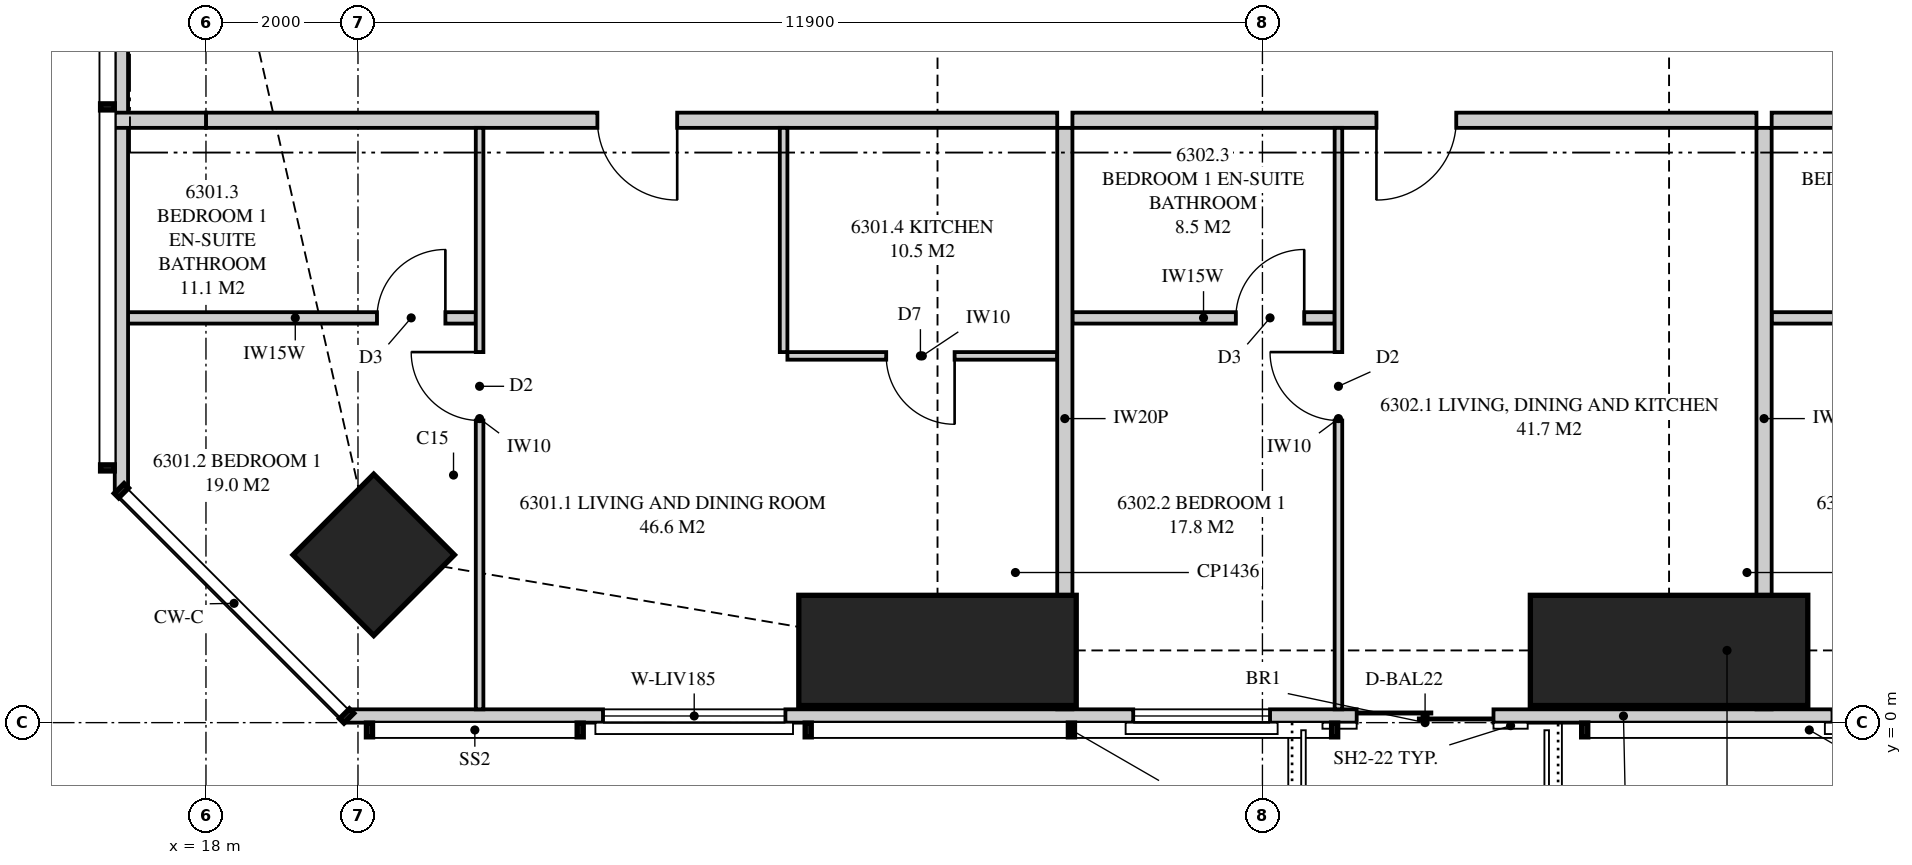
"""IFC4 building model, lengths in metres.
Left out: names, types, materials, properties, quantities, classifications, styles, units other than length and angle.
Written with IfcOpenShell. Run it as: python <this file> out.ifc"""

import sys

from ifc_helpers import new_model, si_unit, direction, frame, frame_2d, origin, origin_2d, place, context, subcontext, project, spatial, polyline, rectangle, outline, extrude, element, fill, save


model = new_model("IFC4")
c1 = context("Model", 3, precision=1e-05, world=origin(), true_north=direction((0.0, 1.0)))
c2 = subcontext(c1, "Body", "Model", "MODEL_VIEW")
j1 = project(units=[si_unit("LENGTHUNIT", "METRE"), si_unit("PLANEANGLEUNIT", "RADIAN")], contexts=[c1])
p1 = place(None, origin())
s1 = spatial("IfcSite", under=j1, at=p1, CompositionType="ELEMENT")
p2 = place(p1, origin())
s2 = spatial("IfcBuilding", under=s1, at=p2, CompositionType="ELEMENT")
p3 = place(p2, frame((0.0, 0.0, 231.95)))
s3 = spatial("IfcBuildingStorey", under=s2, at=p3, CompositionType="ELEMENT", Elevation=231.95)
p4 = place(p3, frame((20.207, 2.207, 0.0), z_axis=(0.0, 0.0, 1.0), x_axis=(0.707106781187, 0.707106781187, 0.0)))
e1 = element("IfcColumn", 1, at=p4, inside=s3, PredefinedType="COLUMN", context=c2, shape_type="SweptSolid", body=[
    extrude(rectangle(XDim=1.5, YDim=1.5, at=origin_2d()), origin(), (0.0, 0.0, 1.0), 3.5),
])
for number, where, z_axis, x_axis in (
    (2, (27.625, 0.95, 0.0), (0.0, 0.0, 1.0), (0.0, 1.0, 0.0)),
    (3, (37.25, 0.95, 0.0), (0.0, 0.0, 1.0), (0.0, 1.0, 0.0)),
):
    element("IfcColumn", number, at=place(p3, frame(where, z_axis=z_axis, x_axis=x_axis)), inside=s3, PredefinedType="COLUMN", context=c2, shape_type="SweptSolid", body=[
        extrude(rectangle(XDim=1.45, YDim=3.65, at=origin_2d()), origin(), (0.0, 0.0, 1.0), 3.5),
    ])
p5 = place(p3, frame((19.851, 0.087, 0.0), z_axis=(0.0, 0.0, 1.0), x_axis=(1.0, 0.0, 0.0)))
e4 = element("IfcWall", 4, at=p5, inside=s3, PredefinedType="SOLIDWALL", context=c2, shape_type="SweptSolid", body=[
    extrude(outline(polyline([(0.0, 0.0), (33.597, 0.0), (33.597, 3.26), (27.239, 3.26), (27.239, 2.3), (27.155, 2.3), (27.155, 3.26), (27.024, 3.26), (27.024, 2.3), (7.774, 2.3), (7.774, 3.26), (7.642, 3.26), (7.642, 2.3), (7.559, 2.3), (7.559, 3.26), (0.0, 3.26), (0.0, 0.0)])), frame((0.0, 0.087, 0.0), z_axis=(0.0, -1.0, 0.0), x_axis=(1.0, 0.0, 0.0)), (0.0, 0.0, 1.0), 0.175),
])
p6 = place(p5, frame((3.373, 0.0, 0.4)))
e5 = element("IfcOpeningElement", 5, at=p6, cuts=e4, PredefinedType="OPENING", context=c2, shape_type="SweptSolid", body=[
    extrude(rectangle(XDim=2.4, YDim=1.85, at=frame_2d((1.2, 0.925))), frame((0.0, 0.097, 0.0), z_axis=(0.0, -1.0, 0.0), x_axis=(1.0, 0.0, 0.0)), (0.0, 0.0, 1.0), 0.195),
])
p7 = place(p5, frame((10.349, 0.0, 0.4)))
e6 = element("IfcOpeningElement", 6, at=p7, cuts=e4, PredefinedType="OPENING", context=c2, shape_type="SweptSolid", body=[
    extrude(rectangle(XDim=1.8, YDim=1.85, at=frame_2d((0.9, 0.925))), frame((0.0, 0.097, 0.0), z_axis=(0.0, -1.0, 0.0), x_axis=(1.0, 0.0, 0.0)), (0.0, 0.0, 1.0), 0.195),
])
p8 = place(p5, frame((13.289, 0.0, 0.0)))
e7 = element("IfcOpeningElement", 7, at=p8, cuts=e4, PredefinedType="OPENING", context=c2, shape_type="SweptSolid", body=[
    extrude(rectangle(XDim=1.8, YDim=2.25, at=frame_2d((0.9, 1.125))), frame((0.0, 0.097, 0.0), z_axis=(0.0, -1.0, 0.0), x_axis=(1.0, 0.0, 0.0)), (0.0, 0.0, 1.0), 0.195),
])
p9 = place(p5, frame((19.549, 0.0, 0.4)))
e8 = element("IfcOpeningElement", 8, at=p9, cuts=e4, PredefinedType="OPENING", context=c2, shape_type="SweptSolid", body=[
    extrude(rectangle(XDim=1.8, YDim=1.85, at=frame_2d((0.9, 0.925))), frame((0.0, 0.097, 0.0), z_axis=(0.0, -1.0, 0.0), x_axis=(1.0, 0.0, 0.0)), (0.0, 0.0, 1.0), 0.195),
])
p10 = place(p5, frame((23.149, 0.0, 0.4)))
e9 = element("IfcOpeningElement", 9, at=p10, cuts=e4, PredefinedType="OPENING", context=c2, shape_type="SweptSolid", body=[
    extrude(rectangle(XDim=1.8, YDim=1.85, at=frame_2d((0.9, 0.925))), frame((0.0, 0.097, 0.0), z_axis=(0.0, -1.0, 0.0), x_axis=(1.0, 0.0, 0.0)), (0.0, 0.0, 1.0), 0.195),
])
p11 = place(p5, frame((28.979, 0.0, 0.4)))
e10 = element("IfcOpeningElement", 10, at=p11, cuts=e4, PredefinedType="OPENING", context=c2, shape_type="SweptSolid", body=[
    extrude(rectangle(XDim=1.8, YDim=1.85, at=frame_2d((0.9, 0.925))), frame((0.0, 0.097, 0.0), z_axis=(0.0, -1.0, 0.0), x_axis=(1.0, 0.0, 0.0)), (0.0, 0.0, 1.0), 0.195),
])
p12 = place(p5, frame((31.861, 0.0, 0.4)))
e11 = element("IfcOpeningElement", 11, at=p12, cuts=e4, PredefinedType="OPENING", context=c2, shape_type="SweptSolid", body=[
    extrude(rectangle(XDim=1.2, YDim=1.85, at=frame_2d((0.6, 0.925))), frame((0.0, 0.097, 0.0), z_axis=(0.0, -1.0, 0.0), x_axis=(1.0, 0.0, 0.0)), (0.0, 0.0, 1.0), 0.195),
])
p13 = place(p3, frame((16.887, 30.949, 0.0), z_axis=(0.0, 0.0, 1.0), x_axis=(0.0, -1.0, 0.0)))
e12 = element("IfcWall", 12, at=p13, inside=s3, PredefinedType="SOLIDWALL", context=c2, shape_type="SweptSolid", body=[
    extrude(outline(polyline([(0.0, 0.0), (27.897, 0.0), (27.897, 3.26), (18.148, 3.26), (18.148, 2.3), (18.125, 2.3), (18.125, 3.26), (17.949, 3.26), (17.949, 2.3), (5.949, 2.3), (5.949, 3.26), (0.0, 3.26), (0.0, 0.0)])), frame((0.0, 0.087, 0.0), z_axis=(0.0, -1.0, 0.0), x_axis=(1.0, 0.0, 0.0)), (0.0, 0.0, 1.0), 0.175),
])
p14 = place(p13, frame((11.849, 0.0, 0.4)))
e13 = element("IfcOpeningElement", 13, at=p14, cuts=e12, PredefinedType="OPENING", context=c2, shape_type="SweptSolid", body=[
    extrude(rectangle(XDim=1.2, YDim=1.85, at=frame_2d((0.6, 0.925))), frame((0.0, 0.097, 0.0), z_axis=(0.0, -1.0, 0.0), x_axis=(1.0, 0.0, 0.0)), (0.0, 0.0, 1.0), 0.195),
])
p15 = place(p3, frame((29.3, 0.175, 0.0), z_axis=(0.0, 0.0, 1.0), x_axis=(0.0, 1.0, 0.0)))
e14 = element("IfcWall", 14, at=p15, inside=s3, PredefinedType="PARTITIONING", context=c2, shape_type="SweptSolid", body=[
    extrude(outline(polyline([(0.0, 0.0), (7.65, 0.0), (7.65, 3.26), (1.685, 3.26), (1.685, 2.3), (0.0, 2.3), (0.0, 3.26), (0.0, 0.0)])), frame((0.0, 0.1, 0.0), z_axis=(0.0, -1.0, 0.0), x_axis=(1.0, 0.0, 0.0)), (0.0, 0.0, 1.0), 0.2),
])
p16 = place(p3, frame((18.0, 7.925, 0.0), z_axis=(0.0, 0.0, 1.0), x_axis=(1.0, 0.0, 0.0)))
e15 = element("IfcWall", 15, at=p16, inside=s3, PredefinedType="PARTITIONING", context=c2, shape_type="SweptSolid", body=[
    extrude(outline(polyline([(0.0, 0.0), (11.2, 0.0), (11.2, 3.26), (10.935, 3.26), (10.935, 2.66), (8.315, 2.66), (8.315, 3.26), (1.839, 3.26), (1.839, 2.3), (0.0, 2.3), (0.0, 3.26), (0.0, 0.0)])), frame((0.0, 0.1, 0.0), z_axis=(0.0, -1.0, 0.0), x_axis=(1.0, 0.0, 0.0)), (0.0, 0.0, 1.0), 0.2),
])
p17 = place(p16, frame((5.15, 0.0, 0.0)))
e16 = element("IfcOpeningElement", 16, at=p17, cuts=e15, PredefinedType="OPENING", context=c2, shape_type="SweptSolid", body=[
    extrude(rectangle(XDim=1.05, YDim=2.2, at=frame_2d((0.525, 1.1))), frame((0.0, 0.11, 0.0), z_axis=(0.0, -1.0, 0.0), x_axis=(1.0, 0.0, 0.0)), (0.0, 0.0, 1.0), 0.22),
])
p18 = place(p3, frame((21.6, 0.175, 0.0), z_axis=(0.0, 0.0, 1.0), x_axis=(0.0, 1.0, 0.0)))
e17 = element("IfcWall", 17, at=p18, inside=s3, PredefinedType="PARTITIONING", context=c2, shape_type="SweptSolid", body=[
    extrude(outline(polyline([(0.0, 0.0), (7.65, 0.0), (7.65, 3.26), (2.668, 3.26), (2.668, 2.3), (0.924, 2.3), (0.924, 3.26), (0.0, 3.26), (0.0, 0.0)])), frame((0.0, 0.05, 0.0), z_axis=(0.0, -1.0, 0.0), x_axis=(1.0, 0.0, 0.0)), (0.0, 0.0, 1.0), 0.1),
])
p19 = place(p18, frame((3.8, 0.0, 0.0)))
e18 = element("IfcOpeningElement", 18, at=p19, cuts=e17, PredefinedType="OPENING", context=c2, shape_type="SweptSolid", body=[
    extrude(rectangle(XDim=0.9, YDim=2.1, at=frame_2d((0.45, 1.05))), frame((0.0, 0.06, 0.0), z_axis=(0.0, -1.0, 0.0), x_axis=(1.0, 0.0, 0.0)), (0.0, 0.0, 1.0), 0.12),
])
p20 = place(p3, frame((16.8, 5.325, 0.0), z_axis=(0.0, 0.0, 1.0), x_axis=(1.0, 0.0, 0.0)))
e19 = element("IfcWall", 19, at=p20, inside=s3, PredefinedType="PLUMBINGWALL", context=c2, shape_type="SweptSolid", body=[
    extrude(outline(polyline([(0.0, 0.0), (4.75, 0.0), (4.75, 3.26), (3.605, 3.26), (3.605, 2.3), (1.79, 2.3), (1.79, 3.26), (0.0, 3.26), (0.0, 0.0)])), frame((0.0, 0.075, 0.0), z_axis=(0.0, -1.0, 0.0), x_axis=(1.0, 0.0, 0.0)), (0.0, 0.0, 1.0), 0.15),
])
p21 = place(p20, frame((3.45, 0.0, 0.0)))
e20 = element("IfcOpeningElement", 20, at=p21, cuts=e19, PredefinedType="OPENING", context=c2, shape_type="SweptSolid", body=[
    extrude(rectangle(XDim=0.9, YDim=2.1, at=frame_2d((0.45, 1.05))), frame((0.0, 0.085, 0.0), z_axis=(0.0, -1.0, 0.0), x_axis=(1.0, 0.0, 0.0)), (0.0, 0.0, 1.0), 0.17),
])
p22 = place(p3, frame((25.65, 4.825, 0.0), z_axis=(0.0, 0.0, 1.0), x_axis=(1.0, 0.0, 0.0)))
e21 = element("IfcWall", 21, at=p22, inside=s3, PredefinedType="PARTITIONING", context=c2, shape_type="SweptSolid", body=[
    extrude(outline(polyline([(0.0, 0.0), (3.55, 0.0), (3.55, 3.26), (3.235, 3.26), (3.235, 2.66), (0.715, 2.66), (0.715, 3.26), (0.0, 3.26), (0.0, 0.0)])), frame((0.0, 0.05, 0.0), z_axis=(0.0, -1.0, 0.0), x_axis=(1.0, 0.0, 0.0)), (0.0, 0.0, 1.0), 0.1),
])
p23 = place(p22, frame((1.3, 0.0, 0.0)))
e22 = element("IfcOpeningElement", 22, at=p23, cuts=e21, PredefinedType="OPENING", context=c2, shape_type="SweptSolid", body=[
    extrude(rectangle(XDim=0.9, YDim=2.1, at=frame_2d((0.45, 1.05))), frame((0.0, 0.06, 0.0), z_axis=(0.0, -1.0, 0.0), x_axis=(1.0, 0.0, 0.0)), (0.0, 0.0, 1.0), 0.12),
])
p24 = place(p3, frame((25.6, 4.875, 0.0), z_axis=(0.0, 0.0, 1.0), x_axis=(0.0, 1.0, 0.0)))
e23 = element("IfcWall", 23, at=p24, inside=s3, PredefinedType="PARTITIONING", context=c2, shape_type="SweptSolid", body=[
    extrude(rectangle(XDim=2.95, YDim=0.1, at=frame_2d((1.475, 0.0))), origin(), (0.0, 0.0, 1.0), 3.26),
])
p25 = place(p3, frame((38.5, 0.175, 0.0), z_axis=(0.0, 0.0, 1.0), x_axis=(0.0, 1.0, 0.0)))
e24 = element("IfcWall", 24, at=p25, inside=s3, PredefinedType="PARTITIONING", context=c2, shape_type="SweptSolid", body=[
    extrude(outline(polyline([(0.529, 2.3), (0.0, 2.3), (0.0, 0.0), (0.529, 0.0), (0.529, 0.281), (1.021, 0.281), (1.021, 0.0), (7.65, 0.0), (7.65, 2.66), (1.685, 2.66), (1.685, 2.3), (1.021, 2.3), (1.021, 2.019), (0.529, 2.019), (0.529, 2.3)])), frame((0.0, 0.1, 0.0), z_axis=(0.0, -1.0, 0.0), x_axis=(1.0, 0.0, 0.0)), (0.0, 0.0, 1.0), 0.2),
])
p26 = place(p3, frame((29.4, 7.925, 0.0), z_axis=(0.0, 0.0, 1.0), x_axis=(1.0, 0.0, 0.0)))
e25 = element("IfcWall", 25, at=p26, inside=s3, PredefinedType="PARTITIONING", context=c2, shape_type="SweptSolid", body=[
    extrude(outline(polyline([(0.0, 0.0), (9.0, 0.0), (9.0, 3.26), (9.0, 2.66), (6.54, 2.66), (6.54, 3.26), (0.0, 3.26), (0.0, 0.0)])), frame((0.0, 0.1, 0.0), z_axis=(0.0, -1.0, 0.0), x_axis=(1.0, 0.0, 0.0)), (0.0, 0.0, 1.0), 0.2),
])
p27 = place(p26, frame((4.0, 0.0, 0.0)))
e26 = element("IfcOpeningElement", 26, at=p27, cuts=e25, PredefinedType="OPENING", context=c2, shape_type="SweptSolid", body=[
    extrude(rectangle(XDim=1.05, YDim=2.2, at=frame_2d((0.525, 1.1))), frame((0.0, 0.11, 0.0), z_axis=(0.0, -1.0, 0.0), x_axis=(1.0, 0.0, 0.0)), (0.0, 0.0, 1.0), 0.22),
])
p28 = place(p3, frame((32.9, 0.175, 0.0), z_axis=(0.0, 0.0, 1.0), x_axis=(0.0, 1.0, 0.0)))
e27 = element("IfcWall", 27, at=p28, inside=s3, PredefinedType="PARTITIONING", context=c2, shape_type="SweptSolid", body=[
    extrude(outline(polyline([(0.0, 0.0), (7.65, 0.0), (7.65, 3.26), (1.635, 3.26), (1.635, 2.3), (0.0, 2.3), (0.0, 3.26), (0.0, 0.0)])), frame((0.0, 0.05, 0.0), z_axis=(0.0, -1.0, 0.0), x_axis=(1.0, 0.0, 0.0)), (0.0, 0.0, 1.0), 0.1),
])
p29 = place(p28, frame((3.8, 0.0, 0.0)))
e28 = element("IfcOpeningElement", 28, at=p29, cuts=e27, PredefinedType="OPENING", context=c2, shape_type="SweptSolid", body=[
    extrude(rectangle(XDim=0.9, YDim=2.1, at=frame_2d((0.45, 1.05))), frame((0.0, 0.06, 0.0), z_axis=(0.0, -1.0, 0.0), x_axis=(1.0, 0.0, 0.0)), (0.0, 0.0, 1.0), 0.12),
])
p30 = place(p3, frame((29.4, 5.325, 0.0), z_axis=(0.0, 0.0, 1.0), x_axis=(1.0, 0.0, 0.0)))
e29 = element("IfcWall", 29, at=p30, inside=s3, PredefinedType="PLUMBINGWALL", context=c2, shape_type="SweptSolid", body=[
    extrude(rectangle(XDim=3.45, YDim=0.15, at=frame_2d((1.725, 0.0))), origin(), (0.0, 0.0, 1.0), 3.26),
])
p31 = place(p30, frame((2.15, 0.0, 0.0)))
e30 = element("IfcOpeningElement", 30, at=p31, cuts=e29, PredefinedType="OPENING", context=c2, shape_type="SweptSolid", body=[
    extrude(rectangle(XDim=0.9, YDim=2.1, at=frame_2d((0.45, 1.05))), frame((0.0, 0.085, 0.0), z_axis=(0.0, -1.0, 0.0), x_axis=(1.0, 0.0, 0.0)), (0.0, 0.0, 1.0), 0.17),
])
p32 = place(p3, frame((38.6, 7.925, 0.0), z_axis=(0.0, 0.0, 1.0), x_axis=(1.0, 0.0, 0.0)))
e31 = element("IfcWall", 31, at=p32, inside=s3, PredefinedType="PARTITIONING", context=c2, shape_type="SweptSolid", body=[
    extrude(outline(polyline([(0.0, 0.0), (17.725, 0.0), (17.725, 3.26), (17.275, 3.26), (17.275, 2.3), (15.443, 2.3), (15.443, 3.26), (9.585, 3.26), (9.585, 2.66), (6.965, 2.66), (6.965, 3.26), (0.0, 3.26), (0.0, 0.0)])), frame((0.0, 0.1, 0.0), z_axis=(0.0, -1.0, 0.0), x_axis=(1.0, 0.0, 0.0)), (0.0, 0.0, 1.0), 0.2),
])
p33 = place(p32, frame((12.9, 0.0, 0.0)))
e32 = element("IfcOpeningElement", 32, at=p33, cuts=e31, PredefinedType="OPENING", context=c2, shape_type="SweptSolid", body=[
    extrude(rectangle(XDim=1.05, YDim=2.2, at=frame_2d((0.525, 1.1))), frame((0.0, 0.11, 0.0), z_axis=(0.0, -1.0, 0.0), x_axis=(1.0, 0.0, 0.0)), (0.0, 0.0, 1.0), 0.22),
])
p34 = place(p3, frame((38.6, 5.325, 0.0), z_axis=(0.0, 0.0, 1.0), x_axis=(1.0, 0.0, 0.0)))
e33 = element("IfcWall", 33, at=p34, inside=s3, PredefinedType="PLUMBINGWALL", context=c2, shape_type="SweptSolid", body=[
    extrude(rectangle(XDim=3.45, YDim=0.15, at=frame_2d((1.725, 0.0))), origin(), (0.0, 0.0, 1.0), 3.26),
])
p35 = place(p34, frame((2.15, 0.0, 0.0)))
e34 = element("IfcOpeningElement", 34, at=p35, cuts=e33, PredefinedType="OPENING", context=c2, shape_type="SweptSolid", body=[
    extrude(rectangle(XDim=0.9, YDim=2.1, at=frame_2d((0.45, 1.05))), frame((0.0, 0.085, 0.0), z_axis=(0.0, -1.0, 0.0), x_axis=(1.0, 0.0, 0.0)), (0.0, 0.0, 1.0), 0.17),
])
p36 = place(p3, frame((16.8, 7.925, 0.0), z_axis=(0.0, 0.0, 1.0), x_axis=(1.0, 0.0, 0.0)))
e35 = element("IfcWall", 35, at=p36, inside=s3, PredefinedType="PARTITIONING", context=c2, shape_type="SweptSolid", body=[
    extrude(outline(polyline([(0.0, 0.0), (1.2, 0.0), (1.2, 3.26), (1.2, 2.3), (1.172, 2.3), (1.172, 3.26), (0.0, 3.26), (0.0, 0.0)])), frame((0.0, 0.1, 0.0), z_axis=(0.0, -1.0, 0.0), x_axis=(1.0, 0.0, 0.0)), (0.0, 0.0, 1.0), 0.2),
])
p37 = place(p6, origin())
e36 = element("IfcWindow", 36, at=p37, inside=s3, PartitioningType="SINGLE_PANEL", PredefinedType="WINDOW", context=c2, shape_type="SweptSolid", body=[
    extrude(rectangle(XDim=2.4, YDim=1.85, at=frame_2d((1.2, 0.925))), frame((0.0, 0.03, 0.0), z_axis=(0.0, -1.0, 0.0), x_axis=(1.0, 0.0, 0.0)), (0.0, 0.0, 1.0), 0.06),
])
fill(e5, e36)
p38 = place(p7, origin())
e37 = element("IfcWindow", 37, at=p38, inside=s3, PartitioningType="SINGLE_PANEL", PredefinedType="WINDOW", context=c2, shape_type="SweptSolid", body=[
    extrude(rectangle(XDim=1.8, YDim=1.85, at=frame_2d((0.9, 0.925))), frame((0.0, 0.03, 0.0), z_axis=(0.0, -1.0, 0.0), x_axis=(1.0, 0.0, 0.0)), (0.0, 0.0, 1.0), 0.06),
])
fill(e6, e37)
p39 = place(p8, origin())
e38 = element("IfcDoor", 38, at=p39, inside=s3, OperationType="SLIDING_TO_LEFT", PredefinedType="DOOR", context=c2, shape_type="SweptSolid", body=[
    extrude(rectangle(XDim=1.8, YDim=2.25, at=frame_2d((0.9, 1.125))), frame((0.0, 0.025, 0.0), z_axis=(0.0, -1.0, 0.0), x_axis=(1.0, 0.0, 0.0)), (0.0, 0.0, 1.0), 0.05),
])
fill(e7, e38)
p40 = place(p9, origin())
e39 = element("IfcWindow", 39, at=p40, inside=s3, PartitioningType="SINGLE_PANEL", PredefinedType="WINDOW", context=c2, shape_type="SweptSolid", body=[
    extrude(rectangle(XDim=1.8, YDim=1.85, at=frame_2d((0.9, 0.925))), frame((0.0, 0.03, 0.0), z_axis=(0.0, -1.0, 0.0), x_axis=(1.0, 0.0, 0.0)), (0.0, 0.0, 1.0), 0.06),
])
fill(e8, e39)
p41 = place(p17, frame((1.05, 0.0, 0.0), z_axis=(0.0, 0.0, 1.0), x_axis=(-1.0, 0.0, 0.0)))
e40 = element("IfcDoor", 40, at=p41, inside=s3, OperationType="SINGLE_SWING_LEFT", PredefinedType="DOOR", context=c2, shape_type="SweptSolid", body=[
    extrude(rectangle(XDim=1.05, YDim=2.2, at=frame_2d((0.525, 1.1))), frame((0.0, 0.025, 0.0), z_axis=(0.0, -1.0, 0.0), x_axis=(1.0, 0.0, 0.0)), (0.0, 0.0, 1.0), 0.05),
])
fill(e16, e40)
p42 = place(p19, origin())
e41 = element("IfcDoor", 41, at=p42, inside=s3, OperationType="SINGLE_SWING_RIGHT", PredefinedType="DOOR", context=c2, shape_type="SweptSolid", body=[
    extrude(rectangle(XDim=0.9, YDim=2.1, at=frame_2d((0.45, 1.05))), frame((0.0, 0.025, 0.0), z_axis=(0.0, -1.0, 0.0), x_axis=(1.0, 0.0, 0.0)), (0.0, 0.0, 1.0), 0.05),
])
fill(e18, e41)
p43 = place(p21, origin())
e42 = element("IfcDoor", 42, at=p43, inside=s3, OperationType="SINGLE_SWING_RIGHT", PredefinedType="DOOR", context=c2, shape_type="SweptSolid", body=[
    extrude(rectangle(XDim=0.9, YDim=2.1, at=frame_2d((0.45, 1.05))), frame((0.0, 0.025, 0.0), z_axis=(0.0, -1.0, 0.0), x_axis=(1.0, 0.0, 0.0)), (0.0, 0.0, 1.0), 0.05),
])
fill(e20, e42)
p44 = place(p23, frame((0.9, 0.0, 0.0), z_axis=(0.0, 0.0, 1.0), x_axis=(-1.0, 0.0, 0.0)))
e43 = element("IfcDoor", 43, at=p44, inside=s3, OperationType="SINGLE_SWING_LEFT", PredefinedType="DOOR", context=c2, shape_type="SweptSolid", body=[
    extrude(rectangle(XDim=0.9, YDim=2.1, at=frame_2d((0.45, 1.05))), frame((0.0, 0.025, 0.0), z_axis=(0.0, -1.0, 0.0), x_axis=(1.0, 0.0, 0.0)), (0.0, 0.0, 1.0), 0.05),
])
fill(e22, e43)
p45 = place(p27, frame((1.05, 0.0, 0.0), z_axis=(0.0, 0.0, 1.0), x_axis=(-1.0, 0.0, 0.0)))
e44 = element("IfcDoor", 44, at=p45, inside=s3, OperationType="SINGLE_SWING_RIGHT", PredefinedType="DOOR", context=c2, shape_type="SweptSolid", body=[
    extrude(rectangle(XDim=1.05, YDim=2.2, at=frame_2d((0.525, 1.1))), frame((0.0, 0.025, 0.0), z_axis=(0.0, -1.0, 0.0), x_axis=(1.0, 0.0, 0.0)), (0.0, 0.0, 1.0), 0.05),
])
fill(e26, e44)
p46 = place(p29, origin())
e45 = element("IfcDoor", 45, at=p46, inside=s3, OperationType="SINGLE_SWING_RIGHT", PredefinedType="DOOR", context=c2, shape_type="SweptSolid", body=[
    extrude(rectangle(XDim=0.9, YDim=2.1, at=frame_2d((0.45, 1.05))), frame((0.0, 0.025, 0.0), z_axis=(0.0, -1.0, 0.0), x_axis=(1.0, 0.0, 0.0)), (0.0, 0.0, 1.0), 0.05),
])
fill(e28, e45)
p47 = place(p31, origin())
e46 = element("IfcDoor", 46, at=p47, inside=s3, OperationType="SINGLE_SWING_RIGHT", PredefinedType="DOOR", context=c2, shape_type="SweptSolid", body=[
    extrude(rectangle(XDim=0.9, YDim=2.1, at=frame_2d((0.45, 1.05))), frame((0.0, 0.025, 0.0), z_axis=(0.0, -1.0, 0.0), x_axis=(1.0, 0.0, 0.0)), (0.0, 0.0, 1.0), 0.05),
])
fill(e30, e46)
save(model, sys.argv[1])
